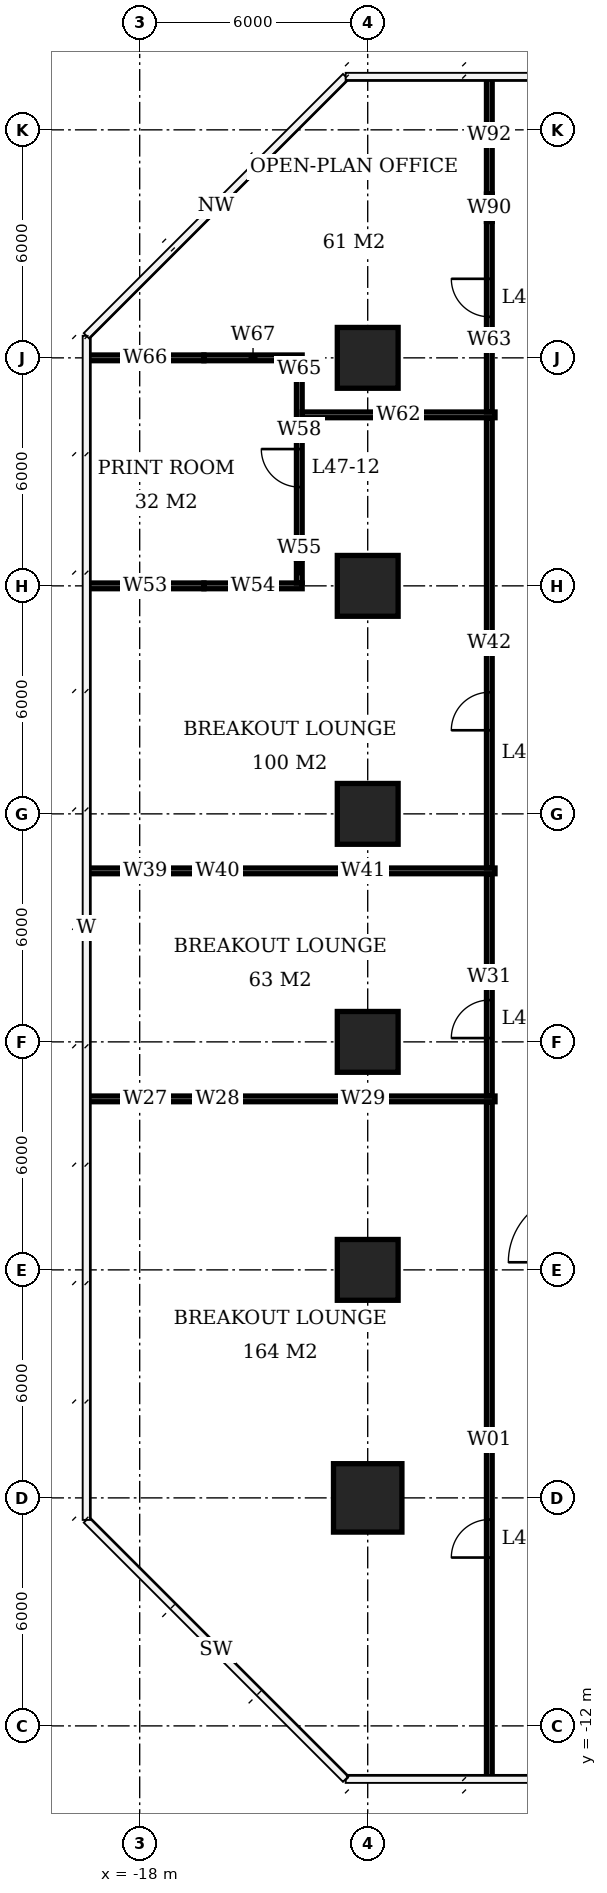
"""IFC4 building model, lengths in metres.
Left out: names, types, materials, properties, quantities, classifications, styles, units other than length and angle.
Written with IfcOpenShell. Run it as: python <this file> out.ifc"""

import sys

from ifc_helpers import new_model, si_unit, direction, frame, frame_2d, origin, origin_2d, place, context, subcontext, project, spatial, rectangle, extrude, element, fill, save


model = new_model("IFC4")
c1 = context("Model", 3, precision=1e-05, world=origin(), true_north=direction((0.0, 1.0)))
c2 = subcontext(c1, "Body", "Model", "MODEL_VIEW")
j1 = project(units=[si_unit("LENGTHUNIT", "METRE"), si_unit("PLANEANGLEUNIT", "RADIAN")], contexts=[c1])
p1 = place(None, origin())
s1 = spatial("IfcSite", under=j1, at=p1, CompositionType="ELEMENT")
p2 = place(p1, origin())
s2 = spatial("IfcBuilding", under=s1, at=p2, CompositionType="ELEMENT")
p3 = place(p2, frame((0.0, 0.0, 192.8)))
s3 = spatial("IfcBuildingStorey", under=s2, at=p3, CompositionType="ELEMENT", Elevation=192.8)
p4 = place(p3, frame((-12.0, -6.0, 0.0), z_axis=(0.0, 0.0, 1.0), x_axis=(1.0, 0.0, 0.0)))
e1 = element("IfcColumn", 1, at=p4, inside=s3, PredefinedType="COLUMN", context=c2, shape_type="SweptSolid", body=[
    extrude(rectangle(XDim=1.8, YDim=1.8, at=origin_2d()), origin(), (0.0, 0.0, 1.0), 3.9),
])
for number, where, z_axis, x_axis in (
    (2, (-12.0, 0.0, 0.0), (0.0, 0.0, 1.0), (1.0, 0.0, 0.0)),
    (3, (-12.0, 6.0, 0.0), (0.0, 0.0, 1.0), (1.0, 0.0, 0.0)),
    (4, (-12.0, 12.0, 0.0), (0.0, 0.0, 1.0), (1.0, 0.0, 0.0)),
    (5, (-12.0, 18.0, 0.0), (0.0, 0.0, 1.0), (1.0, 0.0, 0.0)),
    (6, (-12.0, 24.0, 0.0), (0.0, 0.0, 1.0), (1.0, 0.0, 0.0)),
):
    element("IfcColumn", number, at=place(p3, frame(where, z_axis=z_axis, x_axis=x_axis)), inside=s3, PredefinedType="COLUMN", context=c2, shape_type="SweptSolid", body=[
        extrude(rectangle(XDim=1.6, YDim=1.6, at=origin_2d()), origin(), (0.0, 0.0, 1.0), 3.9),
    ])
p5 = place(p3, frame((-19.4, 18.0, 0.0), z_axis=(0.0, 0.0, 1.0), x_axis=(1.0, 0.0, 0.0)))
e7 = element("IfcWall", 7, at=p5, inside=s3, PredefinedType="PARTITIONING", context=c2, shape_type="SweptSolid", body=[
    extrude(rectangle(XDim=3.09, YDim=0.15, at=frame_2d((1.545, 0.0))), origin(), (0.0, 0.0, 1.0), 3.65),
])
p6 = place(p3, frame((-16.31, 18.0, 0.0), z_axis=(0.0, 0.0, 1.0), x_axis=(1.0, 0.0, 0.0)))
e8 = element("IfcWall", 8, at=p6, inside=s3, PredefinedType="PARTITIONING", context=c2, shape_type="SweptSolid", body=[
    extrude(rectangle(XDim=2.585, YDim=0.15, at=frame_2d((1.292, 0.0))), origin(), (0.0, 0.0, 1.0), 2.65),
])
p7 = place(p3, frame((-19.4, 24.0, 0.0), z_axis=(0.0, 0.0, 1.0), x_axis=(1.0, 0.0, 0.0)))
e9 = element("IfcWall", 9, at=p7, inside=s3, PredefinedType="PARTITIONING", context=c2, shape_type="SweptSolid", body=[
    extrude(rectangle(XDim=3.09, YDim=0.15, at=frame_2d((1.545, 0.0))), origin(), (0.0, 0.0, 1.0), 3.65),
])
p8 = place(p3, frame((-16.31, 24.0, 0.0), z_axis=(0.0, 0.0, 1.0), x_axis=(1.0, 0.0, 0.0)))
e10 = element("IfcWall", 10, at=p8, inside=s3, PredefinedType="PARTITIONING", context=c2, shape_type="SweptSolid", body=[
    extrude(rectangle(XDim=2.585, YDim=0.15, at=frame_2d((1.292, 0.0))), origin(), (0.0, 0.0, 1.0), 2.65),
])
p9 = place(p3, frame((-13.8, 18.075, 0.0), z_axis=(0.0, 0.0, 1.0), x_axis=(0.0, 1.0, 0.0)))
e11 = element("IfcWall", 11, at=p9, inside=s3, PredefinedType="PARTITIONING", context=c2, shape_type="SweptSolid", body=[
    extrude(rectangle(XDim=0.635, YDim=0.15, at=frame_2d((0.317, 0.0))), origin(), (0.0, 0.0, 1.0), 2.65),
])
p10 = place(p3, frame((-13.8, 18.71, 0.0), z_axis=(0.0, 0.0, 1.0), x_axis=(0.0, 1.0, 0.0)))
e12 = element("IfcWall", 12, at=p10, inside=s3, PredefinedType="PARTITIONING", context=c2, shape_type="SweptSolid", body=[
    extrude(rectangle(XDim=4.78, YDim=0.15, at=frame_2d((2.39, 0.0))), origin(), (0.0, 0.0, 1.0), 3.65),
])
p11 = place(p10, frame((1.89, 0.0, 0.0)))
e13 = element("IfcOpeningElement", 13, at=p11, cuts=e12, PredefinedType="OPENING", context=c2, shape_type="SweptSolid", body=[
    extrude(rectangle(XDim=1.0, YDim=2.1, at=frame_2d((0.5, 1.05))), frame((0.0, 0.085, 0.0), z_axis=(0.0, -1.0, 0.0), x_axis=(1.0, 0.0, 0.0)), (0.0, 0.0, 1.0), 0.17),
])
p12 = place(p3, frame((-13.8, 23.49, 0.0), z_axis=(0.0, 0.0, 1.0), x_axis=(0.0, 1.0, 0.0)))
e14 = element("IfcWall", 14, at=p12, inside=s3, PredefinedType="PARTITIONING", context=c2, shape_type="SweptSolid", body=[
    extrude(rectangle(XDim=0.435, YDim=0.15, at=frame_2d((0.218, 0.0))), origin(), (0.0, 0.0, 1.0), 2.65),
])
p13 = place(p3, frame((-19.4, 4.5, 0.0), z_axis=(0.0, 0.0, 1.0), x_axis=(1.0, 0.0, 0.0)))
e15 = element("IfcWall", 15, at=p13, inside=s3, PredefinedType="PARTITIONING", context=c2, shape_type="SweptSolid", body=[
    extrude(rectangle(XDim=3.09, YDim=0.15, at=frame_2d((1.545, 0.0))), origin(), (0.0, 0.0, 1.0), 3.65),
])
p14 = place(p3, frame((-16.31, 4.5, 0.0), z_axis=(0.0, 0.0, 1.0), x_axis=(1.0, 0.0, 0.0)))
e16 = element("IfcWall", 16, at=p14, inside=s3, PredefinedType="PARTITIONING", context=c2, shape_type="SweptSolid", body=[
    extrude(rectangle(XDim=0.72, YDim=0.15, at=frame_2d((0.36, 0.0))), origin(), (0.0, 0.0, 1.0), 2.65),
])
p15 = place(p3, frame((-15.59, 4.5, 0.0), z_axis=(0.0, 0.0, 1.0), x_axis=(1.0, 0.0, 0.0)))
e17 = element("IfcWall", 17, at=p15, inside=s3, PredefinedType="PARTITIONING", context=c2, shape_type="SweptSolid", body=[
    extrude(rectangle(XDim=6.94, YDim=0.15, at=frame_2d((3.47, 0.0))), origin(), (0.0, 0.0, 1.0), 3.65),
])
p16 = place(p3, frame((-19.4, 10.5, 0.0), z_axis=(0.0, 0.0, 1.0), x_axis=(1.0, 0.0, 0.0)))
e18 = element("IfcWall", 18, at=p16, inside=s3, PredefinedType="PARTITIONING", context=c2, shape_type="SweptSolid", body=[
    extrude(rectangle(XDim=3.09, YDim=0.15, at=frame_2d((1.545, 0.0))), origin(), (0.0, 0.0, 1.0), 3.65),
])
p17 = place(p3, frame((-16.31, 10.5, 0.0), z_axis=(0.0, 0.0, 1.0), x_axis=(1.0, 0.0, 0.0)))
e19 = element("IfcWall", 19, at=p17, inside=s3, PredefinedType="PARTITIONING", context=c2, shape_type="SweptSolid", body=[
    extrude(rectangle(XDim=0.72, YDim=0.15, at=frame_2d((0.36, 0.0))), origin(), (0.0, 0.0, 1.0), 2.65),
])
p18 = place(p3, frame((-15.59, 10.5, 0.0), z_axis=(0.0, 0.0, 1.0), x_axis=(1.0, 0.0, 0.0)))
e20 = element("IfcWall", 20, at=p18, inside=s3, PredefinedType="PARTITIONING", context=c2, shape_type="SweptSolid", body=[
    extrude(rectangle(XDim=6.94, YDim=0.15, at=frame_2d((3.47, 0.0))), origin(), (0.0, 0.0, 1.0), 3.65),
])
p19 = place(p3, frame((-13.725, 22.5, 0.0), z_axis=(0.0, 0.0, 1.0), x_axis=(1.0, 0.0, 0.0)))
e21 = element("IfcWall", 21, at=p19, inside=s3, PredefinedType="PARTITIONING", context=c2, shape_type="SweptSolid", body=[
    extrude(rectangle(XDim=5.075, YDim=0.15, at=frame_2d((2.538, 0.0))), origin(), (0.0, 0.0, 1.0), 3.65),
])
p20 = place(p3, frame((-8.8, -13.4, 0.0), z_axis=(0.0, 0.0, 1.0), x_axis=(0.0, 1.0, 0.0)))
e22 = element("IfcWall", 22, at=p20, inside=s3, PredefinedType="PARTITIONING", context=c2, shape_type="SweptSolid", body=[
    extrude(rectangle(XDim=17.825, YDim=0.15, at=frame_2d((8.913, 0.0))), origin(), (0.0, 0.0, 1.0), 3.65),
])
p21 = place(p20, frame((5.83, 0.0, 0.0)))
e23 = element("IfcOpeningElement", 23, at=p21, cuts=e22, PredefinedType="OPENING", context=c2, shape_type="SweptSolid", body=[
    extrude(rectangle(XDim=1.0, YDim=2.1, at=frame_2d((0.5, 1.05))), frame((0.0, 0.085, 0.0), z_axis=(0.0, -1.0, 0.0), x_axis=(1.0, 0.0, 0.0)), (0.0, 0.0, 1.0), 0.17),
])
p22 = place(p3, frame((-8.8, 4.575, 0.0), z_axis=(0.0, 0.0, 1.0), x_axis=(0.0, 1.0, 0.0)))
e24 = element("IfcWall", 24, at=p22, inside=s3, PredefinedType="PARTITIONING", context=c2, shape_type="SweptSolid", body=[
    extrude(rectangle(XDim=5.85, YDim=0.15, at=frame_2d((2.925, 0.0))), origin(), (0.0, 0.0, 1.0), 3.65),
])
p23 = place(p22, frame((1.525, 0.0, 0.0)))
e25 = element("IfcOpeningElement", 25, at=p23, cuts=e24, PredefinedType="OPENING", context=c2, shape_type="SweptSolid", body=[
    extrude(rectangle(XDim=1.0, YDim=2.1, at=frame_2d((0.5, 1.05))), frame((0.0, 0.085, 0.0), z_axis=(0.0, -1.0, 0.0), x_axis=(1.0, 0.0, 0.0)), (0.0, 0.0, 1.0), 0.17),
])
p24 = place(p3, frame((-8.8, 10.575, 0.0), z_axis=(0.0, 0.0, 1.0), x_axis=(0.0, 1.0, 0.0)))
e26 = element("IfcWall", 26, at=p24, inside=s3, PredefinedType="PARTITIONING", context=c2, shape_type="SweptSolid", body=[
    extrude(rectangle(XDim=11.85, YDim=0.15, at=frame_2d((5.925, 0.0))), origin(), (0.0, 0.0, 1.0), 3.65),
])
p25 = place(p24, frame((3.625, 0.0, 0.0)))
e27 = element("IfcOpeningElement", 27, at=p25, cuts=e26, PredefinedType="OPENING", context=c2, shape_type="SweptSolid", body=[
    extrude(rectangle(XDim=1.0, YDim=2.1, at=frame_2d((0.5, 1.05))), frame((0.0, 0.085, 0.0), z_axis=(0.0, -1.0, 0.0), x_axis=(1.0, 0.0, 0.0)), (0.0, 0.0, 1.0), 0.17),
])
p26 = place(p3, frame((-8.8, 22.575, 0.0), z_axis=(0.0, 0.0, 1.0), x_axis=(0.0, 1.0, 0.0)))
e28 = element("IfcWall", 28, at=p26, inside=s3, PredefinedType="PARTITIONING", context=c2, shape_type="SweptSolid", body=[
    extrude(rectangle(XDim=5.015, YDim=0.15, at=frame_2d((2.508, 0.0))), origin(), (0.0, 0.0, 1.0), 3.65),
])
p27 = place(p26, frame((2.505, 0.0, 0.0)))
e29 = element("IfcOpeningElement", 29, at=p27, cuts=e28, PredefinedType="OPENING", context=c2, shape_type="SweptSolid", body=[
    extrude(rectangle(XDim=1.0, YDim=2.1, at=frame_2d((0.5, 1.05))), frame((0.0, 0.085, 0.0), z_axis=(0.0, -1.0, 0.0), x_axis=(1.0, 0.0, 0.0)), (0.0, 0.0, 1.0), 0.17),
])
p28 = place(p3, frame((-8.8, 27.59, 0.0), z_axis=(0.0, 0.0, 1.0), x_axis=(0.0, 1.0, 0.0)))
e30 = element("IfcWall", 30, at=p28, inside=s3, PredefinedType="PARTITIONING", context=c2, shape_type="SweptSolid", body=[
    extrude(rectangle(XDim=0.72, YDim=0.15, at=frame_2d((0.36, 0.0))), origin(), (0.0, 0.0, 1.0), 2.65),
])
p29 = place(p3, frame((-8.8, 28.31, 0.0), z_axis=(0.0, 0.0, 1.0), x_axis=(0.0, 1.0, 0.0)))
e31 = element("IfcWall", 31, at=p29, inside=s3, PredefinedType="PARTITIONING", context=c2, shape_type="SweptSolid", body=[
    extrude(rectangle(XDim=3.09, YDim=0.15, at=frame_2d((1.545, 0.0))), origin(), (0.0, 0.0, 1.0), 3.65),
])
p30 = place(p11, origin())
e32 = element("IfcDoor", 32, at=p30, inside=s3, OperationType="SINGLE_SWING_RIGHT", PredefinedType="DOOR", context=c2, shape_type="SweptSolid", body=[
    extrude(rectangle(XDim=1.0, YDim=2.1, at=frame_2d((0.5, 1.05))), frame((0.0, 0.025, 0.0), z_axis=(0.0, -1.0, 0.0), x_axis=(1.0, 0.0, 0.0)), (0.0, 0.0, 1.0), 0.05),
])
fill(e13, e32)
p31 = place(p21, origin())
e33 = element("IfcDoor", 33, at=p31, inside=s3, OperationType="SINGLE_SWING_LEFT", PredefinedType="DOOR", context=c2, shape_type="SweptSolid", body=[
    extrude(rectangle(XDim=1.0, YDim=2.1, at=frame_2d((0.5, 1.05))), frame((0.0, 0.025, 0.0), z_axis=(0.0, -1.0, 0.0), x_axis=(1.0, 0.0, 0.0)), (0.0, 0.0, 1.0), 0.05),
])
fill(e23, e33)
p32 = place(p23, origin())
e34 = element("IfcDoor", 34, at=p32, inside=s3, OperationType="SINGLE_SWING_LEFT", PredefinedType="DOOR", context=c2, shape_type="SweptSolid", body=[
    extrude(rectangle(XDim=1.0, YDim=2.1, at=frame_2d((0.5, 1.05))), frame((0.0, 0.025, 0.0), z_axis=(0.0, -1.0, 0.0), x_axis=(1.0, 0.0, 0.0)), (0.0, 0.0, 1.0), 0.05),
])
fill(e25, e34)
p33 = place(p25, origin())
e35 = element("IfcDoor", 35, at=p33, inside=s3, OperationType="SINGLE_SWING_LEFT", PredefinedType="DOOR", context=c2, shape_type="SweptSolid", body=[
    extrude(rectangle(XDim=1.0, YDim=2.1, at=frame_2d((0.5, 1.05))), frame((0.0, 0.025, 0.0), z_axis=(0.0, -1.0, 0.0), x_axis=(1.0, 0.0, 0.0)), (0.0, 0.0, 1.0), 0.05),
])
fill(e27, e35)
p34 = place(p27, origin())
e36 = element("IfcDoor", 36, at=p34, inside=s3, OperationType="SINGLE_SWING_RIGHT", PredefinedType="DOOR", context=c2, shape_type="SweptSolid", body=[
    extrude(rectangle(XDim=1.0, YDim=2.1, at=frame_2d((0.5, 1.05))), frame((0.0, 0.025, 0.0), z_axis=(0.0, -1.0, 0.0), x_axis=(1.0, 0.0, 0.0)), (0.0, 0.0, 1.0), 0.05),
])
fill(e29, e36)
save(model, sys.argv[1])
